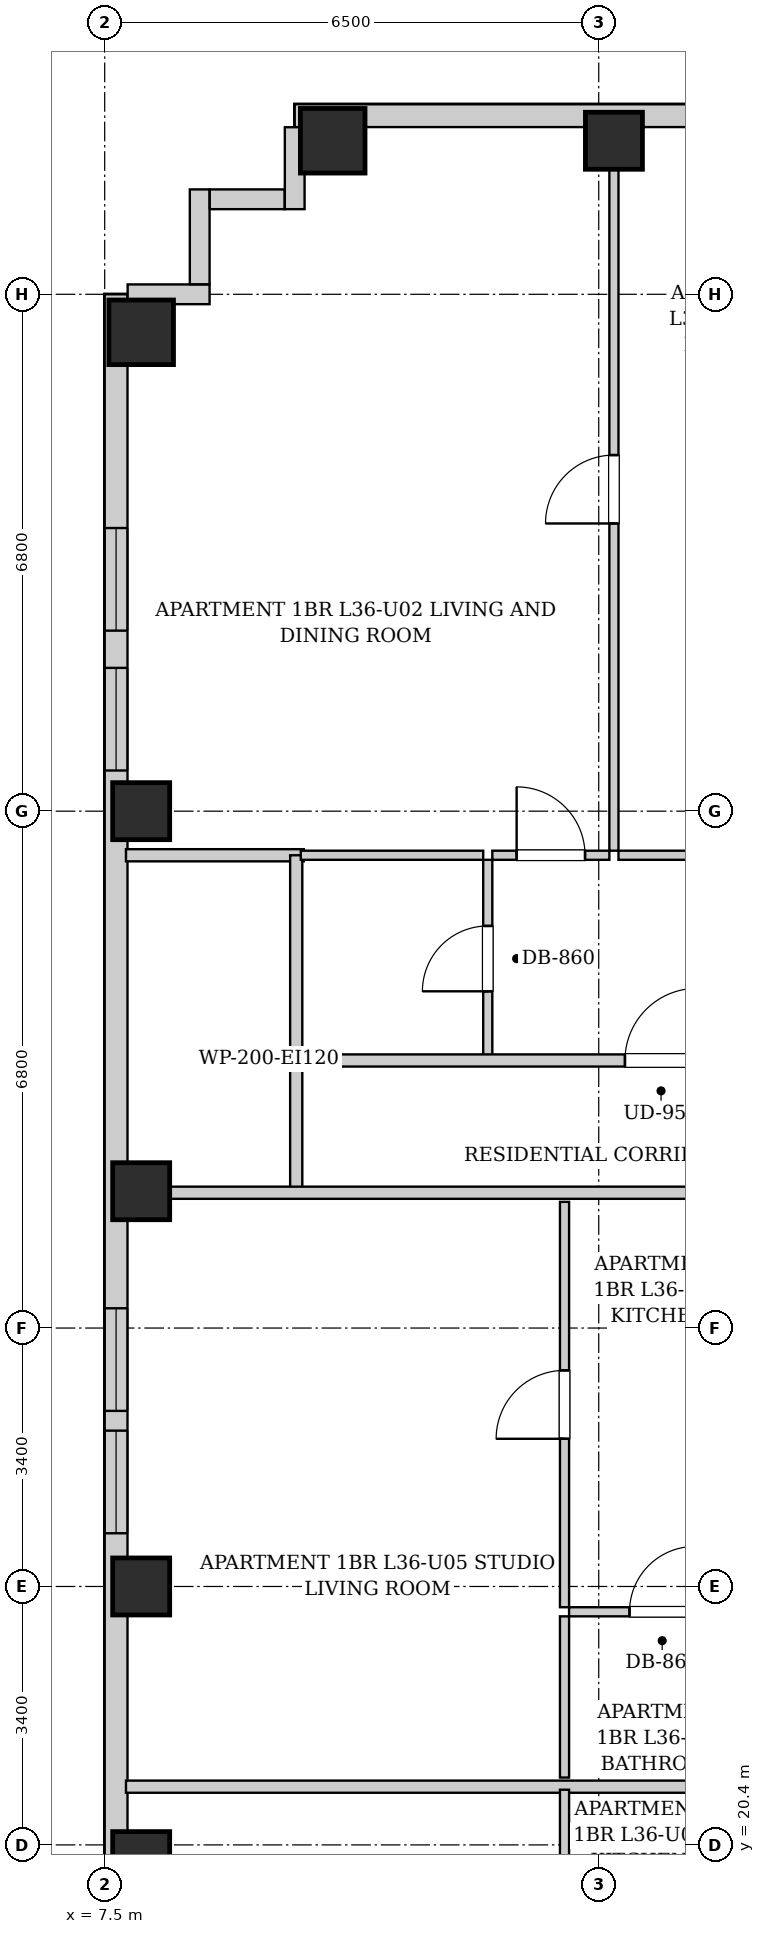
"""IFC4 building model, lengths in metres.
Left out: names, types, materials, properties, quantities, classifications, styles, units other than length and angle.
Written with IfcOpenShell. Run it as: python <this file> out.ifc"""

import sys

from ifc_helpers import new_model, si_unit, direction, frame, frame_2d, origin, origin_2d, place, context, subcontext, project, spatial, rectangle, extrude, element, fill, save


model = new_model("IFC4")
c1 = context("Model", 3, precision=1e-05, world=origin(), true_north=direction((0.0, 1.0)))
c2 = subcontext(c1, "Body", "Model", "MODEL_VIEW")
j1 = project(units=[si_unit("LENGTHUNIT", "METRE"), si_unit("PLANEANGLEUNIT", "RADIAN")], contexts=[c1])
p1 = place(None, origin())
s1 = spatial("IfcSite", under=j1, at=p1, CompositionType="ELEMENT")
p2 = place(p1, origin())
s2 = spatial("IfcBuilding", under=s1, at=p2, CompositionType="ELEMENT")
p3 = place(p2, frame((0.0, 0.0, 127.65)))
s3 = spatial("IfcBuildingStorey", under=s2, at=p3, CompositionType="ELEMENT", Elevation=127.65)
p4 = place(p3, frame((10.5, 42.82, 0.0), z_axis=(0.0, 0.0, 1.0), x_axis=(1.0, 0.0, 0.0)))
e1 = element("IfcColumn", 1, at=p4, inside=s3, PredefinedType="COLUMN", context=c2, shape_type="SweptSolid", body=[
    extrude(rectangle(XDim=0.85, YDim=0.85, at=origin_2d()), origin(), (0.0, 0.0, 1.0), 3.25),
])
for number, where, z_axis, x_axis in (
    (2, (14.2, 42.82, 0.0), (0.0, 0.0, 1.0), (1.0, 0.0, 0.0)),
    (3, (7.98, 20.2, 0.0), (0.0, 0.0, 1.0), (1.0, 0.0, 0.0)),
    (4, (7.98, 23.8, 0.0), (0.0, 0.0, 1.0), (1.0, 0.0, 0.0)),
    (5, (7.98, 29.0, 0.0), (0.0, 0.0, 1.0), (1.0, 0.0, 0.0)),
    (6, (7.98, 34.0, 0.0), (0.0, 0.0, 1.0), (1.0, 0.0, 0.0)),
):
    element("IfcColumn", number, at=place(p3, frame(where, z_axis=z_axis, x_axis=x_axis)), inside=s3, PredefinedType="COLUMN", context=c2, shape_type="SweptSolid", body=[
        extrude(rectangle(XDim=0.75, YDim=0.75, at=origin_2d()), origin(), (0.0, 0.0, 1.0), 3.25),
    ])
p5 = place(p3, frame((7.98, 40.3, 0.0), z_axis=(0.0, 0.0, 1.0), x_axis=(1.0, 0.0, 0.0)))
e7 = element("IfcColumn", 7, at=p5, inside=s3, PredefinedType="COLUMN", context=c2, shape_type="SweptSolid", body=[
    extrude(rectangle(XDim=0.85, YDim=0.85, at=origin_2d()), origin(), (0.0, 0.0, 1.0), 3.25),
])
p6 = place(p3, frame((10.0, 43.15, 0.0), z_axis=(0.0, 0.0, 1.0), x_axis=(1.0, 0.0, 0.0)))
e8 = element("IfcWall", 8, at=p6, inside=s3, PredefinedType="SOLIDWALL", context=c2, shape_type="SweptSolid", body=[
    extrude(rectangle(XDim=21.9, YDim=0.3, at=frame_2d((10.95, 0.0))), origin(), (0.0, 0.0, 1.0), 2.99),
])
p7 = place(p6, frame((5.475, 0.0, 0.55)))
e9 = element("IfcOpeningElement", 9, at=p7, cuts=e8, PredefinedType="OPENING", context=c2, shape_type="SweptSolid", body=[
    extrude(rectangle(XDim=1.35, YDim=1.2, at=frame_2d((0.675, 0.6))), frame((0.0, 0.16, 0.0), z_axis=(0.0, -1.0, 0.0), x_axis=(1.0, 0.0, 0.0)), (0.0, 0.0, 1.0), 0.32),
])
p8 = place(p6, frame((9.15, 0.0, 0.55)))
e10 = element("IfcOpeningElement", 10, at=p8, cuts=e8, PredefinedType="OPENING", context=c2, shape_type="SweptSolid", body=[
    extrude(rectangle(XDim=1.35, YDim=1.2, at=frame_2d((0.675, 0.6))), frame((0.0, 0.16, 0.0), z_axis=(0.0, -1.0, 0.0), x_axis=(1.0, 0.0, 0.0)), (0.0, 0.0, 1.0), 0.32),
])
p9 = place(p6, frame((17.5, 0.0, 0.55)))
e11 = element("IfcOpeningElement", 11, at=p9, cuts=e8, PredefinedType="OPENING", context=c2, shape_type="SweptSolid", body=[
    extrude(rectangle(XDim=1.35, YDim=1.2, at=frame_2d((0.675, 0.6))), frame((0.0, 0.16, 0.0), z_axis=(0.0, -1.0, 0.0), x_axis=(1.0, 0.0, 0.0)), (0.0, 0.0, 1.0), 0.32),
])
p10 = place(p6, frame((19.8, 0.0, 0.55)))
e12 = element("IfcOpeningElement", 12, at=p10, cuts=e8, PredefinedType="OPENING", context=c2, shape_type="SweptSolid", body=[
    extrude(rectangle(XDim=1.35, YDim=1.2, at=frame_2d((0.675, 0.6))), frame((0.0, 0.16, 0.0), z_axis=(0.0, -1.0, 0.0), x_axis=(1.0, 0.0, 0.0)), (0.0, 0.0, 1.0), 0.32),
])
p11 = place(p3, frame((7.65, 6.3, 0.0), z_axis=(0.0, 0.0, 1.0), x_axis=(0.0, 1.0, 0.0)))
e13 = element("IfcWall", 13, at=p11, inside=s3, PredefinedType="SOLIDWALL", context=c2, shape_type="SweptSolid", body=[
    extrude(rectangle(XDim=34.5, YDim=0.3, at=frame_2d((17.25, 0.0))), origin(), (0.0, 0.0, 1.0), 2.99),
])
p12 = place(p11, frame((1.575, 0.0, 0.55)))
e14 = element("IfcOpeningElement", 14, at=p12, cuts=e13, PredefinedType="OPENING", context=c2, shape_type="SweptSolid", body=[
    extrude(rectangle(XDim=1.35, YDim=1.2, at=frame_2d((0.675, 0.6))), frame((0.0, 0.16, 0.0), z_axis=(0.0, -1.0, 0.0), x_axis=(1.0, 0.0, 0.0)), (0.0, 0.0, 1.0), 0.32),
])
p13 = place(p11, frame((30.075, 0.0, 0.55)))
e15 = element("IfcOpeningElement", 15, at=p13, cuts=e13, PredefinedType="OPENING", context=c2, shape_type="SweptSolid", body=[
    extrude(rectangle(XDim=1.35, YDim=1.2, at=frame_2d((0.675, 0.6))), frame((0.0, 0.16, 0.0), z_axis=(0.0, -1.0, 0.0), x_axis=(1.0, 0.0, 0.0)), (0.0, 0.0, 1.0), 0.32),
])
p14 = place(p11, frame((28.235, 0.0, 0.55)))
e16 = element("IfcOpeningElement", 16, at=p14, cuts=e13, PredefinedType="OPENING", context=c2, shape_type="SweptSolid", body=[
    extrude(rectangle(XDim=1.35, YDim=1.2, at=frame_2d((0.675, 0.6))), frame((0.0, 0.16, 0.0), z_axis=(0.0, -1.0, 0.0), x_axis=(1.0, 0.0, 0.0)), (0.0, 0.0, 1.0), 0.32),
])
p15 = place(p11, frame((11.175, 0.0, 0.55)))
e17 = element("IfcOpeningElement", 17, at=p15, cuts=e13, PredefinedType="OPENING", context=c2, shape_type="SweptSolid", body=[
    extrude(rectangle(XDim=1.35, YDim=1.2, at=frame_2d((0.675, 0.6))), frame((0.0, 0.16, 0.0), z_axis=(0.0, -1.0, 0.0), x_axis=(1.0, 0.0, 0.0)), (0.0, 0.0, 1.0), 0.32),
])
p16 = place(p11, frame((9.235, 0.0, 0.55)))
e18 = element("IfcOpeningElement", 18, at=p16, cuts=e13, PredefinedType="OPENING", context=c2, shape_type="SweptSolid", body=[
    extrude(rectangle(XDim=1.35, YDim=1.2, at=frame_2d((0.675, 0.6))), frame((0.0, 0.16, 0.0), z_axis=(0.0, -1.0, 0.0), x_axis=(1.0, 0.0, 0.0)), (0.0, 0.0, 1.0), 0.32),
])
p17 = place(p11, frame((18.2, 0.0, 0.55)))
e19 = element("IfcOpeningElement", 19, at=p17, cuts=e13, PredefinedType="OPENING", context=c2, shape_type="SweptSolid", body=[
    extrude(rectangle(XDim=1.35, YDim=1.2, at=frame_2d((0.675, 0.6))), frame((0.0, 0.16, 0.0), z_axis=(0.0, -1.0, 0.0), x_axis=(1.0, 0.0, 0.0)), (0.0, 0.0, 1.0), 0.32),
])
p18 = place(p11, frame((19.81, 0.0, 0.55)))
e20 = element("IfcOpeningElement", 20, at=p18, cuts=e13, PredefinedType="OPENING", context=c2, shape_type="SweptSolid", body=[
    extrude(rectangle(XDim=1.35, YDim=1.2, at=frame_2d((0.675, 0.6))), frame((0.0, 0.16, 0.0), z_axis=(0.0, -1.0, 0.0), x_axis=(1.0, 0.0, 0.0)), (0.0, 0.0, 1.0), 0.32),
])
p19 = place(p3, frame((7.802, 40.8, 0.0), z_axis=(0.0, 0.0, 1.0), x_axis=(1.0, 0.0, 0.0)))
e21 = element("IfcWall", 21, at=p19, inside=s3, PredefinedType="SOLIDWALL", context=c2, shape_type="SweptSolid", body=[
    extrude(rectangle(XDim=1.078, YDim=0.26, at=frame_2d((0.539, 0.0))), origin(), (0.0, 0.0, 1.0), 2.99),
])
p20 = place(p3, frame((8.75, 40.932, 0.0), z_axis=(0.0, 0.0, 1.0), x_axis=(0.0, 1.0, 0.0)))
e22 = element("IfcWall", 22, at=p20, inside=s3, PredefinedType="SOLIDWALL", context=c2, shape_type="SweptSolid", body=[
    extrude(rectangle(XDim=1.248, YDim=0.26, at=frame_2d((0.624, 0.0))), origin(), (0.0, 0.0, 1.0), 2.99),
])
p21 = place(p3, frame((8.882, 42.05, 0.0), z_axis=(0.0, 0.0, 1.0), x_axis=(1.0, 0.0, 0.0)))
e23 = element("IfcWall", 23, at=p21, inside=s3, PredefinedType="SOLIDWALL", context=c2, shape_type="SweptSolid", body=[
    extrude(rectangle(XDim=0.986, YDim=0.26, at=frame_2d((0.493, 0.0))), origin(), (0.0, 0.0, 1.0), 2.99),
])
p22 = place(p3, frame((10.0, 41.92, 0.0), z_axis=(0.0, 0.0, 1.0), x_axis=(0.0, 1.0, 0.0)))
e24 = element("IfcWall", 24, at=p22, inside=s3, PredefinedType="SOLIDWALL", context=c2, shape_type="SweptSolid", body=[
    extrude(rectangle(XDim=1.078, YDim=0.26, at=frame_2d((0.539, 0.0))), origin(), (0.0, 0.0, 1.0), 2.99),
])
p23 = place(p3, frame((10.02, 28.98, 0.0), z_axis=(0.0, 0.0, 1.0), x_axis=(0.0, 1.0, 0.0)))
e25 = element("IfcWall", 25, at=p23, inside=s3, PredefinedType="PARTITIONING", context=c2, shape_type="SweptSolid", body=[
    extrude(rectangle(XDim=1.74, YDim=0.16, at=frame_2d((0.87, 0.0))), origin(), (0.0, 0.0, 1.0), 2.99),
])
p24 = place(p3, frame((7.78, 28.98, 0.0), z_axis=(0.0, 0.0, 1.0), x_axis=(1.0, 0.0, 0.0)))
e26 = element("IfcWall", 26, at=p24, inside=s3, PredefinedType="PARTITIONING", context=c2, shape_type="SweptSolid", body=[
    extrude(rectangle(XDim=8.36, YDim=0.16, at=frame_2d((4.18, 0.0))), origin(), (0.0, 0.0, 1.0), 2.426),
])
p25 = place(p3, frame((7.78, 33.42, 0.0), z_axis=(0.0, 0.0, 1.0), x_axis=(1.0, 0.0, 0.0)))
e27 = element("IfcWall", 27, at=p25, inside=s3, PredefinedType="PARTITIONING", context=c2, shape_type="SweptSolid", body=[
    extrude(rectangle(XDim=2.34, YDim=0.16, at=frame_2d((1.17, 0.0))), origin(), (0.0, 0.0, 1.0), 2.99),
])
p26 = place(p3, frame((10.02, 30.76, 0.0), z_axis=(0.0, 0.0, 1.0), x_axis=(0.0, 1.0, 0.0)))
e28 = element("IfcWall", 28, at=p26, inside=s3, PredefinedType="PARTITIONING", context=c2, shape_type="SweptSolid", body=[
    extrude(rectangle(XDim=2.66, YDim=0.16, at=frame_2d((1.33, 0.0))), origin(), (0.0, 0.0, 1.0), 2.99),
])
p27 = place(p3, frame((12.54, 30.76, 0.0), z_axis=(0.0, 0.0, 1.0), x_axis=(0.0, 1.0, 0.0)))
e29 = element("IfcWall", 29, at=p27, inside=s3, PredefinedType="PARTITIONING", context=c2, shape_type="SweptSolid", body=[
    extrude(rectangle(XDim=2.6, YDim=0.12, at=frame_2d((1.3, 0.0))), origin(), (0.0, 0.0, 1.0), 2.99),
])
p28 = place(p27, frame((0.87, 0.0, 0.0)))
e30 = element("IfcOpeningElement", 30, at=p28, cuts=e29, PredefinedType="OPENING", context=c2, shape_type="SweptSolid", body=[
    extrude(rectangle(XDim=0.86, YDim=2.05, at=frame_2d((0.43, 1.025))), frame((0.0, 0.07, 0.0), z_axis=(0.0, -1.0, 0.0), x_axis=(1.0, 0.0, 0.0)), (0.0, 0.0, 1.0), 0.14),
])
p29 = place(p3, frame((10.08, 33.42, 0.0), z_axis=(0.0, 0.0, 1.0), x_axis=(1.0, 0.0, 0.0)))
e31 = element("IfcWall", 31, at=p29, inside=s3, PredefinedType="PARTITIONING", context=c2, shape_type="SweptSolid", body=[
    extrude(rectangle(XDim=2.4, YDim=0.12, at=frame_2d((1.2, 0.0))), origin(), (0.0, 0.0, 1.0), 2.99),
])
p30 = place(p3, frame((12.6, 33.42, 0.0), z_axis=(0.0, 0.0, 1.0), x_axis=(1.0, 0.0, 0.0)))
e32 = element("IfcWall", 32, at=p30, inside=s3, PredefinedType="PARTITIONING", context=c2, shape_type="SweptSolid", body=[
    extrude(rectangle(XDim=1.54, YDim=0.12, at=frame_2d((0.77, 0.0))), origin(), (0.0, 0.0, 1.0), 2.99),
])
p31 = place(p30, frame((0.32, 0.0, 0.0)))
e33 = element("IfcOpeningElement", 33, at=p31, cuts=e32, PredefinedType="OPENING", context=c2, shape_type="SweptSolid", body=[
    extrude(rectangle(XDim=0.9, YDim=2.05, at=frame_2d((0.45, 1.025))), frame((0.0, 0.07, 0.0), z_axis=(0.0, -1.0, 0.0), x_axis=(1.0, 0.0, 0.0)), (0.0, 0.0, 1.0), 0.14),
])
p32 = place(p3, frame((14.26, 33.42, 0.0), z_axis=(0.0, 0.0, 1.0), x_axis=(1.0, 0.0, 0.0)))
e34 = element("IfcWall", 34, at=p32, inside=s3, PredefinedType="PARTITIONING", context=c2, shape_type="SweptSolid", body=[
    extrude(rectangle(XDim=2.78, YDim=0.12, at=frame_2d((1.39, 0.0))), origin(), (0.0, 0.0, 1.0), 2.99),
])
p33 = place(p32, frame((0.94, 0.0, 0.0)))
e35 = element("IfcOpeningElement", 35, at=p33, cuts=e34, PredefinedType="OPENING", context=c2, shape_type="SweptSolid", body=[
    extrude(rectangle(XDim=0.9, YDim=2.05, at=frame_2d((0.45, 1.025))), frame((0.0, 0.07, 0.0), z_axis=(0.0, -1.0, 0.0), x_axis=(1.0, 0.0, 0.0)), (0.0, 0.0, 1.0), 0.14),
])
p34 = place(p3, frame((14.2, 33.48, 0.0), z_axis=(0.0, 0.0, 1.0), x_axis=(0.0, 1.0, 0.0)))
e36 = element("IfcWall", 36, at=p34, inside=s3, PredefinedType="PARTITIONING", context=c2, shape_type="SweptSolid", body=[
    extrude(rectangle(XDim=9.54, YDim=0.12, at=frame_2d((4.77, 0.0))), origin(), (0.0, 0.0, 1.0), 2.99),
])
p35 = place(p34, frame((4.305, 0.0, 0.0)))
e37 = element("IfcOpeningElement", 37, at=p35, cuts=e36, PredefinedType="OPENING", context=c2, shape_type="SweptSolid", body=[
    extrude(rectangle(XDim=0.9, YDim=2.05, at=frame_2d((0.45, 1.025))), frame((0.0, 0.07, 0.0), z_axis=(0.0, -1.0, 0.0), x_axis=(1.0, 0.0, 0.0)), (0.0, 0.0, 1.0), 0.14),
])
p36 = place(p3, frame((7.78, 21.166, 0.0), z_axis=(0.0, 0.0, 1.0), x_axis=(1.0, 0.0, 0.0)))
e38 = element("IfcWall", 38, at=p36, inside=s3, PredefinedType="PARTITIONING", context=c2, shape_type="SweptSolid", body=[
    extrude(rectangle(XDim=8.28, YDim=0.16, at=frame_2d((4.14, 0.0))), origin(), (0.0, 0.0, 1.0), 2.99),
])
p37 = place(p3, frame((13.55, 17.18, 0.0), z_axis=(0.0, 0.0, 1.0), x_axis=(0.0, 1.0, 0.0)))
e39 = element("IfcWall", 39, at=p37, inside=s3, PredefinedType="PARTITIONING", context=c2, shape_type="SweptSolid", body=[
    extrude(rectangle(XDim=3.946, YDim=0.12, at=frame_2d((1.973, 0.0))), origin(), (0.0, 0.0, 1.0), 2.99),
])
p38 = place(p37, frame((1.523, 0.0, 0.0)))
e40 = element("IfcOpeningElement", 40, at=p38, cuts=e39, PredefinedType="OPENING", context=c2, shape_type="SweptSolid", body=[
    extrude(rectangle(XDim=0.9, YDim=2.05, at=frame_2d((0.45, 1.025))), frame((0.0, 0.07, 0.0), z_axis=(0.0, -1.0, 0.0), x_axis=(1.0, 0.0, 0.0)), (0.0, 0.0, 1.0), 0.14),
])
p39 = place(p3, frame((13.61, 23.467, 0.0), z_axis=(0.0, 0.0, 1.0), x_axis=(1.0, 0.0, 0.0)))
e41 = element("IfcWall", 41, at=p39, inside=s3, PredefinedType="PARTITIONING", context=c2, shape_type="SweptSolid", body=[
    extrude(rectangle(XDim=2.45, YDim=0.12, at=frame_2d((1.225, 0.0))), origin(), (0.0, 0.0, 1.0), 2.99),
])
p40 = place(p39, frame((0.795, 0.0, 0.0)))
e42 = element("IfcOpeningElement", 42, at=p40, cuts=e41, PredefinedType="OPENING", context=c2, shape_type="SweptSolid", body=[
    extrude(rectangle(XDim=0.86, YDim=2.05, at=frame_2d((0.43, 1.025))), frame((0.0, 0.07, 0.0), z_axis=(0.0, -1.0, 0.0), x_axis=(1.0, 0.0, 0.0)), (0.0, 0.0, 1.0), 0.14),
])
p41 = place(p3, frame((13.55, 21.286, 0.0), z_axis=(0.0, 0.0, 1.0), x_axis=(0.0, 1.0, 0.0)))
e43 = element("IfcWall", 43, at=p41, inside=s3, PredefinedType="PARTITIONING", context=c2, shape_type="SweptSolid", body=[
    extrude(rectangle(XDim=2.121, YDim=0.12, at=frame_2d((1.061, 0.0))), origin(), (0.0, 0.0, 1.0), 2.99),
])
p42 = place(p3, frame((13.55, 23.527, 0.0), z_axis=(0.0, 0.0, 1.0), x_axis=(0.0, 1.0, 0.0)))
e44 = element("IfcWall", 44, at=p42, inside=s3, PredefinedType="PARTITIONING", context=c2, shape_type="SweptSolid", body=[
    extrude(rectangle(XDim=5.333, YDim=0.12, at=frame_2d((2.667, 0.0))), origin(), (0.0, 0.0, 1.0), 2.99),
])
p43 = place(p42, frame((2.216, 0.0, 0.0)))
e45 = element("IfcOpeningElement", 45, at=p43, cuts=e44, PredefinedType="OPENING", context=c2, shape_type="SweptSolid", body=[
    extrude(rectangle(XDim=0.9, YDim=2.05, at=frame_2d((0.45, 1.025))), frame((0.0, 0.07, 0.0), z_axis=(0.0, -1.0, 0.0), x_axis=(1.0, 0.0, 0.0)), (0.0, 0.0, 1.0), 0.14),
])
p44 = place(p3, frame((10.05, 30.72, 0.0), z_axis=(0.0, 0.0, 1.0), x_axis=(1.0, 0.0, 0.0)))
e46 = element("IfcWall", 46, at=p44, inside=s3, PredefinedType="PARTITIONING", context=c2, shape_type="SweptSolid", body=[
    extrude(rectangle(XDim=27.7, YDim=0.16, at=frame_2d((13.85, 0.0))), origin(), (0.0, 0.0, 1.0), 2.99),
])
p45 = place(p44, frame((4.295, 0.0, 0.0)))
e47 = element("IfcOpeningElement", 47, at=p45, cuts=e46, PredefinedType="OPENING", context=c2, shape_type="SweptSolid", body=[
    extrude(rectangle(XDim=0.95, YDim=2.1, at=frame_2d((0.475, 1.05))), frame((0.0, 0.09, 0.0), z_axis=(0.0, -1.0, 0.0), x_axis=(1.0, 0.0, 0.0)), (0.0, 0.0, 1.0), 0.18),
])
p46 = place(p44, frame((23.785, 0.0, 0.0)))
e48 = element("IfcOpeningElement", 48, at=p46, cuts=e46, PredefinedType="OPENING", context=c2, shape_type="SweptSolid", body=[
    extrude(rectangle(XDim=0.95, YDim=2.1, at=frame_2d((0.475, 1.05))), frame((0.0, 0.09, 0.0), z_axis=(0.0, -1.0, 0.0), x_axis=(1.0, 0.0, 0.0)), (0.0, 0.0, 1.0), 0.18),
])
p47 = place(p28, origin())
e49 = element("IfcDoor", 49, at=p47, inside=s3, OperationType="SINGLE_SWING_LEFT", PredefinedType="DOOR", context=c2, shape_type="SweptSolid", body=[
    extrude(rectangle(XDim=0.86, YDim=2.05, at=frame_2d((0.43, 1.025))), frame((0.0, 0.025, 0.0), z_axis=(0.0, -1.0, 0.0), x_axis=(1.0, 0.0, 0.0)), (0.0, 0.0, 1.0), 0.05),
])
fill(e30, e49)
p48 = place(p31, origin())
e50 = element("IfcDoor", 50, at=p48, inside=s3, OperationType="SINGLE_SWING_LEFT", PredefinedType="DOOR", context=c2, shape_type="SweptSolid", body=[
    extrude(rectangle(XDim=0.9, YDim=2.05, at=frame_2d((0.45, 1.025))), frame((0.0, 0.025, 0.0), z_axis=(0.0, -1.0, 0.0), x_axis=(1.0, 0.0, 0.0)), (0.0, 0.0, 1.0), 0.05),
])
fill(e33, e50)
p49 = place(p35, origin())
e51 = element("IfcDoor", 51, at=p49, inside=s3, OperationType="SINGLE_SWING_LEFT", PredefinedType="DOOR", context=c2, shape_type="SweptSolid", body=[
    extrude(rectangle(XDim=0.9, YDim=2.05, at=frame_2d((0.45, 1.025))), frame((0.0, 0.025, 0.0), z_axis=(0.0, -1.0, 0.0), x_axis=(1.0, 0.0, 0.0)), (0.0, 0.0, 1.0), 0.05),
])
fill(e37, e51)
p50 = place(p40, origin())
e52 = element("IfcDoor", 52, at=p50, inside=s3, OperationType="SINGLE_SWING_RIGHT", PredefinedType="DOOR", context=c2, shape_type="SweptSolid", body=[
    extrude(rectangle(XDim=0.86, YDim=2.05, at=frame_2d((0.43, 1.025))), frame((0.0, 0.025, 0.0), z_axis=(0.0, -1.0, 0.0), x_axis=(1.0, 0.0, 0.0)), (0.0, 0.0, 1.0), 0.05),
])
fill(e42, e52)
p51 = place(p43, origin())
e53 = element("IfcDoor", 53, at=p51, inside=s3, OperationType="SINGLE_SWING_LEFT", PredefinedType="DOOR", context=c2, shape_type="SweptSolid", body=[
    extrude(rectangle(XDim=0.9, YDim=2.05, at=frame_2d((0.45, 1.025))), frame((0.0, 0.025, 0.0), z_axis=(0.0, -1.0, 0.0), x_axis=(1.0, 0.0, 0.0)), (0.0, 0.0, 1.0), 0.05),
])
fill(e45, e53)
p52 = place(p45, origin())
e54 = element("IfcDoor", 54, at=p52, inside=s3, OperationType="SINGLE_SWING_RIGHT", PredefinedType="DOOR", context=c2, shape_type="SweptSolid", body=[
    extrude(rectangle(XDim=0.95, YDim=2.1, at=frame_2d((0.475, 1.05))), frame((0.0, 0.025, 0.0), z_axis=(0.0, -1.0, 0.0), x_axis=(1.0, 0.0, 0.0)), (0.0, 0.0, 1.0), 0.05),
])
fill(e47, e54)
p53 = place(p13, origin())
e55 = element("IfcWindow", 55, at=p53, inside=s3, PartitioningType="SINGLE_PANEL", PredefinedType="WINDOW", context=c2, shape_type="SweptSolid", body=[
    extrude(rectangle(XDim=1.35, YDim=1.2, at=frame_2d((0.675, 0.6))), frame((0.0, 0.03, 0.0), z_axis=(0.0, -1.0, 0.0), x_axis=(1.0, 0.0, 0.0)), (0.0, 0.0, 1.0), 0.06),
])
fill(e15, e55)
p54 = place(p14, origin())
e56 = element("IfcWindow", 56, at=p54, inside=s3, PartitioningType="SINGLE_PANEL", PredefinedType="WINDOW", context=c2, shape_type="SweptSolid", body=[
    extrude(rectangle(XDim=1.35, YDim=1.2, at=frame_2d((0.675, 0.6))), frame((0.0, 0.03, 0.0), z_axis=(0.0, -1.0, 0.0), x_axis=(1.0, 0.0, 0.0)), (0.0, 0.0, 1.0), 0.06),
])
fill(e16, e56)
p55 = place(p17, origin())
e57 = element("IfcWindow", 57, at=p55, inside=s3, PartitioningType="SINGLE_PANEL", PredefinedType="WINDOW", context=c2, shape_type="SweptSolid", body=[
    extrude(rectangle(XDim=1.35, YDim=1.2, at=frame_2d((0.675, 0.6))), frame((0.0, 0.03, 0.0), z_axis=(0.0, -1.0, 0.0), x_axis=(1.0, 0.0, 0.0)), (0.0, 0.0, 1.0), 0.06),
])
fill(e19, e57)
p56 = place(p18, origin())
e58 = element("IfcWindow", 58, at=p56, inside=s3, PartitioningType="SINGLE_PANEL", PredefinedType="WINDOW", context=c2, shape_type="SweptSolid", body=[
    extrude(rectangle(XDim=1.35, YDim=1.2, at=frame_2d((0.675, 0.6))), frame((0.0, 0.03, 0.0), z_axis=(0.0, -1.0, 0.0), x_axis=(1.0, 0.0, 0.0)), (0.0, 0.0, 1.0), 0.06),
])
fill(e20, e58)
save(model, sys.argv[1])
